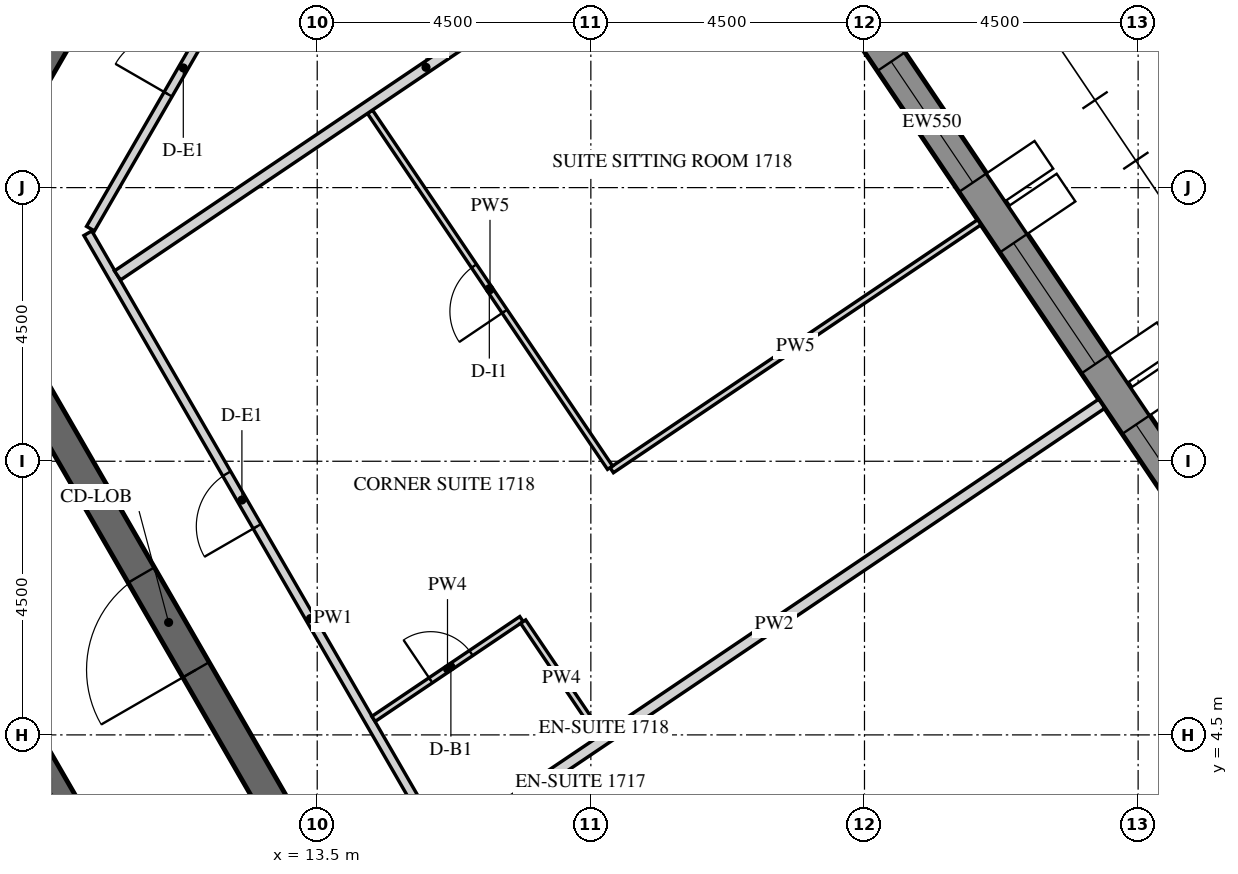
"""IFC4 building model, lengths in metres.
Left out: names, types, materials, properties, quantities, classifications, styles, units other than length and angle.
Written with IfcOpenShell. Run it as: python <this file> out.ifc"""

import sys

from ifc_helpers import new_model, si_unit, direction, frame, frame_2d, origin, place, context, subcontext, project, spatial, polyline, rectangle, outline, extrude, element, fill, save


model = new_model("IFC4")
c1 = context("Model", 3, precision=1e-05, world=origin(), true_north=direction((0.0, 1.0)))
c2 = subcontext(c1, "Body", "Model", "MODEL_VIEW")
j1 = project(units=[si_unit("LENGTHUNIT", "METRE"), si_unit("PLANEANGLEUNIT", "RADIAN")], contexts=[c1])
p1 = place(None, origin())
s1 = spatial("IfcSite", under=j1, at=p1, CompositionType="ELEMENT")
p2 = place(p1, origin())
s2 = spatial("IfcBuilding", under=s1, at=p2, CompositionType="ELEMENT")
p3 = place(p2, frame((0.0, 0.0, 215.1)))
s3 = spatial("IfcBuildingStorey", under=s2, at=p3, CompositionType="ELEMENT", Elevation=215.1)
p4 = place(p3, frame((31.371, 3.071, -0.15), z_axis=(0.0, 0.0, 1.0), x_axis=(-0.559189891278, 0.829039604297, 0.0)))
e1 = element("IfcWall", 1, at=p4, inside=s3, PredefinedType="SOLIDWALL", context=c2, shape_type="SweptSolid", body=[
    extrude(outline(polyline([(-0.026, -0.275), (27.781, -0.275), (27.736, 0.275), (0.026, 0.275), (-0.026, -0.275)])), origin(), (0.0, 0.0, 1.0), 3.9),
])
p5 = place(p4, frame((1.879, 0.0, 1.05)))
e2 = element("IfcOpeningElement", 2, at=p5, cuts=e1, PredefinedType="OPENING", context=c2, shape_type="SweptSolid", body=[
    extrude(rectangle(XDim=2.4, YDim=2.4, at=frame_2d((1.2, 1.2))), frame((0.0, 0.285, 0.0), z_axis=(0.0, -1.0, 0.0), x_axis=(1.0, 0.0, 0.0)), (0.0, 0.0, 1.0), 0.57),
])
p6 = place(p4, frame((5.479, 0.0, 1.05)))
e3 = element("IfcOpeningElement", 3, at=p6, cuts=e1, PredefinedType="OPENING", context=c2, shape_type="SweptSolid", body=[
    extrude(rectangle(XDim=2.4, YDim=2.4, at=frame_2d((1.2, 1.2))), frame((0.0, 0.285, 0.0), z_axis=(0.0, -1.0, 0.0), x_axis=(1.0, 0.0, 0.0)), (0.0, 0.0, 1.0), 0.57),
])
p7 = place(p4, frame((9.079, 0.0, 1.05)))
e4 = element("IfcOpeningElement", 4, at=p7, cuts=e1, PredefinedType="OPENING", context=c2, shape_type="SweptSolid", body=[
    extrude(rectangle(XDim=2.4, YDim=2.4, at=frame_2d((1.2, 1.2))), frame((0.0, 0.285, 0.0), z_axis=(0.0, -1.0, 0.0), x_axis=(1.0, 0.0, 0.0)), (0.0, 0.0, 1.0), 0.57),
])
p8 = place(p4, frame((12.679, 0.0, 1.05)))
e5 = element("IfcOpeningElement", 5, at=p8, cuts=e1, PredefinedType="OPENING", context=c2, shape_type="SweptSolid", body=[
    extrude(rectangle(XDim=2.4, YDim=2.4, at=frame_2d((1.2, 1.2))), frame((0.0, 0.285, 0.0), z_axis=(0.0, -1.0, 0.0), x_axis=(1.0, 0.0, 0.0)), (0.0, 0.0, 1.0), 0.57),
])
p9 = place(p4, frame((16.279, 0.0, 1.05)))
e6 = element("IfcOpeningElement", 6, at=p9, cuts=e1, PredefinedType="OPENING", context=c2, shape_type="SweptSolid", body=[
    extrude(rectangle(XDim=2.4, YDim=2.4, at=frame_2d((1.2, 1.2))), frame((0.0, 0.285, 0.0), z_axis=(0.0, -1.0, 0.0), x_axis=(1.0, 0.0, 0.0)), (0.0, 0.0, 1.0), 0.57),
])
p10 = place(p4, frame((19.879, 0.0, 1.05)))
e7 = element("IfcOpeningElement", 7, at=p10, cuts=e1, PredefinedType="OPENING", context=c2, shape_type="SweptSolid", body=[
    extrude(rectangle(XDim=2.4, YDim=2.4, at=frame_2d((1.2, 1.2))), frame((0.0, 0.285, 0.0), z_axis=(0.0, -1.0, 0.0), x_axis=(1.0, 0.0, 0.0)), (0.0, 0.0, 1.0), 0.57),
])
p11 = place(p4, frame((23.479, 0.0, 1.05)))
e8 = element("IfcOpeningElement", 8, at=p11, cuts=e1, PredefinedType="OPENING", context=c2, shape_type="SweptSolid", body=[
    extrude(rectangle(XDim=2.4, YDim=2.4, at=frame_2d((1.2, 1.2))), frame((0.0, 0.285, 0.0), z_axis=(0.0, -1.0, 0.0), x_axis=(1.0, 0.0, 0.0)), (0.0, 0.0, 1.0), 0.57),
])
p12 = place(p3, frame((14.722, 0.0, -0.15), z_axis=(0.0, 0.0, 1.0), x_axis=(-0.50000571537, 0.866022103989, 0.0)))
e9 = element("IfcWall", 9, at=p12, inside=s3, PredefinedType="SHEAR", context=c2, shape_type="SweptSolid", body=[
    extrude(outline(polyline([(-0.144, -0.25), (14.867, -0.25), (14.578, 0.25), (0.144, 0.25), (-0.144, -0.25)])), origin(), (0.0, 0.0, 1.0), 3.9),
])
p13 = place(p12, frame((6.432, 0.0, 0.15)))
e10 = element("IfcOpeningElement", 10, at=p13, cuts=e9, PredefinedType="OPENING", context=c2, shape_type="SweptSolid", body=[
    extrude(rectangle(XDim=1.8, YDim=2.4, at=frame_2d((0.9, 1.2))), frame((0.0, 0.26, 0.0), z_axis=(0.0, -1.0, 0.0), x_axis=(1.0, 0.0, 0.0)), (0.0, 0.0, 1.0), 0.52),
])
p14 = place(p3, frame((7.506, 13.0, -0.15), z_axis=(0.0, 0.0, 1.0), x_axis=(0.499988271576, 0.866032175087, 0.0)))
e11 = element("IfcWall", 11, at=p14, inside=s3, PredefinedType="SHEAR", context=c2, shape_type="SweptSolid", body=[
    extrude(rectangle(XDim=15.424, YDim=0.5, at=frame_2d((7.712, 0.0))), origin(), (0.0, 0.0, 1.0), 3.9),
])
p15 = place(p14, frame((6.812, 0.0, 0.15)))
e12 = element("IfcOpeningElement", 12, at=p15, cuts=e11, PredefinedType="OPENING", context=c2, shape_type="SweptSolid", body=[
    extrude(rectangle(XDim=1.8, YDim=2.4, at=frame_2d((0.9, 1.2))), frame((0.0, 0.26, 0.0), z_axis=(0.0, -1.0, 0.0), x_axis=(1.0, 0.0, 0.0)), (0.0, 0.0, 1.0), 0.52),
])
p16 = place(p3, frame((11.345, 0.0, -0.15), z_axis=(0.0, 0.0, 1.0), x_axis=(-0.499995046907, 0.866028263435, 0.0)))
e13 = element("IfcWall", 13, at=p16, inside=s3, PredefinedType="SHEAR", context=c2, shape_type="SweptSolid", body=[
    extrude(outline(polyline([(-0.101, -0.175), (11.446, -0.175), (11.244, 0.175), (0.101, 0.175), (-0.101, -0.175)])), origin(), (0.0, 0.0, 1.0), 3.9),
])
p17 = place(p16, frame((4.744, 0.0, 0.15)))
e14 = element("IfcOpeningElement", 14, at=p17, cuts=e13, PredefinedType="OPENING", context=c2, shape_type="SweptSolid", body=[
    extrude(rectangle(XDim=1.8, YDim=2.4, at=frame_2d((0.9, 1.2))), frame((0.0, 0.185, 0.0), z_axis=(0.0, -1.0, 0.0), x_axis=(1.0, 0.0, 0.0)), (0.0, 0.0, 1.0), 0.37),
])
p18 = place(p3, frame((10.149, 21.678, 0.0), z_axis=(0.0, 0.0, 1.0), x_axis=(-0.499997422768, -0.866026891745, 0.0)))
e15 = element("IfcWall", 15, at=p18, inside=s3, PredefinedType="PARTITIONING", context=c2, shape_type="SweptSolid", body=[
    extrude(rectangle(XDim=7.942, YDim=0.15, at=frame_2d((3.971, 0.0))), origin(), (0.0, 0.0, 1.0), 2.988),
])
p19 = place(p3, frame((17.046, 0.075, 0.0), z_axis=(0.0, 0.0, 1.0), x_axis=(-0.500008833422, 0.866020303746, 0.0)))
e16 = element("IfcWall", 16, at=p19, inside=s3, PredefinedType="PARTITIONING", context=c2, shape_type="SweptSolid", body=[
    extrude(rectangle(XDim=14.636, YDim=0.15, at=frame_2d((7.318, 0.0))), origin(), (0.0, 0.0, 1.0), 2.988),
])
p20 = place(p19, frame((9.07, 0.0, 0.0)))
e17 = element("IfcOpeningElement", 17, at=p20, cuts=e16, PredefinedType="OPENING", context=c2, shape_type="SweptSolid", body=[
    extrude(rectangle(XDim=1.0, YDim=2.1, at=frame_2d((0.5, 1.05))), frame((0.0, 0.085, 0.0), z_axis=(0.0, -1.0, 0.0), x_axis=(1.0, 0.0, 0.0)), (0.0, 0.0, 1.0), 0.17),
])
p21 = place(p3, frame((9.772, 12.825, 0.0), z_axis=(0.0, 0.0, 1.0), x_axis=(0.499989830942, 0.866031274813, 0.0)))
e18 = element("IfcWall", 18, at=p21, inside=s3, PredefinedType="PARTITIONING", context=c2, shape_type="SweptSolid", body=[
    extrude(rectangle(XDim=7.93, YDim=0.15, at=frame_2d((3.965, 0.0))), origin(), (0.0, 0.0, 1.0), 2.988),
])
p22 = place(p21, frame((2.552, 0.0, 0.0)))
e19 = element("IfcOpeningElement", 19, at=p22, cuts=e18, PredefinedType="OPENING", context=c2, shape_type="SweptSolid", body=[
    extrude(rectangle(XDim=1.0, YDim=2.1, at=frame_2d((0.5, 1.05))), frame((0.0, 0.085, 0.0), z_axis=(0.0, -1.0, 0.0), x_axis=(1.0, 0.0, 0.0)), (0.0, 0.0, 1.0), 0.17),
])
p23 = place(p3, frame((15.807, 2.372, 0.0), z_axis=(0.0, 0.0, 1.0), x_axis=(0.86601045545, 0.500025890382, 0.0)))
e20 = element("IfcWall", 20, at=p23, inside=s3, PredefinedType="PARTITIONING", context=c2, shape_type="SweptSolid", body=[
    extrude(rectangle(XDim=2.925, YDim=0.1, at=frame_2d((1.462, 0.0))), origin(), (0.0, 0.0, 1.0), 2.988),
])
p24 = place(p3, frame((18.365, 3.791, 0.0), z_axis=(0.0, 0.0, 1.0), x_axis=(0.499996545922, -0.866027397988, 0.0)))
e21 = element("IfcWall", 21, at=p24, inside=s3, PredefinedType="PARTITIONING", context=c2, shape_type="SweptSolid", body=[
    extrude(rectangle(XDim=2.75, YDim=0.1, at=frame_2d((1.375, 0.0))), origin(), (0.0, 0.0, 1.0), 2.988),
])
p25 = place(p3, frame((26.402, 9.946, 0.0), z_axis=(0.0, 0.0, 1.0), x_axis=(-0.829032022697, -0.559201131386, 0.0)))
e22 = element("IfcWall", 22, at=p25, inside=s3, PredefinedType="PARTITIONING", context=c2, shape_type="SweptSolid", body=[
    extrude(rectangle(XDim=12.995, YDim=0.18, at=frame_2d((6.497, 0.0))), origin(), (0.0, 0.0, 1.0), 2.988),
])
p26 = place(p3, frame((14.426, 4.763, 0.0), z_axis=(0.0, 0.0, 1.0), x_axis=(0.829055983973, 0.559165606451, 0.0)))
e23 = element("IfcWall", 23, at=p26, inside=s3, PredefinedType="PARTITIONING", context=c2, shape_type="SweptSolid", body=[
    extrude(rectangle(XDim=2.935, YDim=0.1, at=frame_2d((1.467, 0.0))), origin(), (0.0, 0.0, 1.0), 2.988),
])
p27 = place(p26, frame((1.135, 0.0, 0.0)))
e24 = element("IfcOpeningElement", 24, at=p27, cuts=e23, PredefinedType="OPENING", context=c2, shape_type="SweptSolid", body=[
    extrude(rectangle(XDim=0.8, YDim=2.1, at=frame_2d((0.4, 1.05))), frame((0.0, 0.06, 0.0), z_axis=(0.0, -1.0, 0.0), x_axis=(1.0, 0.0, 0.0)), (0.0, 0.0, 1.0), 0.12),
])
p28 = place(p3, frame((16.887, 6.363, 0.0), z_axis=(0.0, 0.0, 1.0), x_axis=(0.559179660023, -0.829046505219, 0.0)))
e25 = element("IfcWall", 25, at=p28, inside=s3, PredefinedType="PARTITIONING", context=c2, shape_type="SweptSolid", body=[
    extrude(rectangle(XDim=2.26, YDim=0.1, at=frame_2d((1.13, 0.0))), origin(), (0.0, 0.0, 1.0), 2.988),
])
p29 = place(p3, frame((24.389, 12.931, 0.0), z_axis=(0.0, 0.0, 1.0), x_axis=(-0.829029895244, -0.559204285383, 0.0)))
e26 = element("IfcWall", 26, at=p29, inside=s3, PredefinedType="PARTITIONING", context=c2, shape_type="SweptSolid", body=[
    extrude(rectangle(XDim=7.292, YDim=0.1, at=frame_2d((3.646, 0.0))), origin(), (0.0, 0.0, 1.0), 2.988),
])
p30 = place(p3, frame((18.315, 8.895, 0.0), z_axis=(0.0, 0.0, 1.0), x_axis=(-0.559177045947, 0.829048268369, 0.0)))
e27 = element("IfcWall", 27, at=p30, inside=s3, PredefinedType="PARTITIONING", context=c2, shape_type="SweptSolid", body=[
    extrude(rectangle(XDim=7.06, YDim=0.1, at=frame_2d((3.53, 0.0))), origin(), (0.0, 0.0, 1.0), 2.988),
])
p31 = place(p30, frame((3.1, 0.0, 0.0)))
e28 = element("IfcOpeningElement", 28, at=p31, cuts=e27, PredefinedType="OPENING", context=c2, shape_type="SweptSolid", body=[
    extrude(rectangle(XDim=0.9, YDim=2.1, at=frame_2d((0.45, 1.05))), frame((0.0, 0.06, 0.0), z_axis=(0.0, -1.0, 0.0), x_axis=(1.0, 0.0, 0.0)), (0.0, 0.0, 1.0), 0.12),
])
p32 = place(p3, frame((20.363, 18.9, 0.0), z_axis=(0.0, 0.0, 1.0), x_axis=(-0.829030622766, -0.559203206819, 0.0)))
e29 = element("IfcWall", 29, at=p32, inside=s3, PredefinedType="PARTITIONING", context=c2, shape_type="SweptSolid", body=[
    extrude(rectangle(XDim=12.239, YDim=0.18, at=frame_2d((6.12, 0.0))), origin(), (0.0, 0.0, 1.0), 2.988),
])
p33 = place(p6, frame((0.0, 0.205, 0.0)))
e30 = element("IfcWindow", 30, at=p33, inside=s3, PartitioningType="DOUBLE_PANEL_VERTICAL", PredefinedType="WINDOW", context=c2, shape_type="SweptSolid", body=[
    extrude(rectangle(XDim=2.4, YDim=2.4, at=frame_2d((1.2, 1.2))), frame((0.0, 0.03, 0.0), z_axis=(0.0, -1.0, 0.0), x_axis=(1.0, 0.0, 0.0)), (0.0, 0.0, 1.0), 0.06),
])
fill(e3, e30)
p34 = place(p7, frame((0.0, 0.205, 0.0)))
e31 = element("IfcWindow", 31, at=p34, inside=s3, PartitioningType="DOUBLE_PANEL_VERTICAL", PredefinedType="WINDOW", context=c2, shape_type="SweptSolid", body=[
    extrude(rectangle(XDim=2.4, YDim=2.4, at=frame_2d((1.2, 1.2))), frame((0.0, 0.03, 0.0), z_axis=(0.0, -1.0, 0.0), x_axis=(1.0, 0.0, 0.0)), (0.0, 0.0, 1.0), 0.06),
])
fill(e4, e31)
p35 = place(p8, frame((0.0, 0.205, 0.0)))
e32 = element("IfcWindow", 32, at=p35, inside=s3, PartitioningType="DOUBLE_PANEL_VERTICAL", PredefinedType="WINDOW", context=c2, shape_type="SweptSolid", body=[
    extrude(rectangle(XDim=2.4, YDim=2.4, at=frame_2d((1.2, 1.2))), frame((0.0, 0.03, 0.0), z_axis=(0.0, -1.0, 0.0), x_axis=(1.0, 0.0, 0.0)), (0.0, 0.0, 1.0), 0.06),
])
fill(e5, e32)
p36 = place(p13, origin())
e33 = element("IfcDoor", 33, at=p36, inside=s3, OperationType="DOUBLE_DOOR_SINGLE_SWING", PredefinedType="DOOR", context=c2, shape_type="SweptSolid", body=[
    extrude(rectangle(XDim=1.8, YDim=2.4, at=frame_2d((0.9, 1.2))), frame((0.0, 0.025, 0.0), z_axis=(0.0, -1.0, 0.0), x_axis=(1.0, 0.0, 0.0)), (0.0, 0.0, 1.0), 0.05),
])
fill(e10, e33)
p37 = place(p20, origin())
e34 = element("IfcDoor", 34, at=p37, inside=s3, OperationType="SINGLE_SWING_RIGHT", PredefinedType="DOOR", context=c2, shape_type="SweptSolid", body=[
    extrude(rectangle(XDim=1.0, YDim=2.1, at=frame_2d((0.5, 1.05))), frame((0.0, 0.025, 0.0), z_axis=(0.0, -1.0, 0.0), x_axis=(1.0, 0.0, 0.0)), (0.0, 0.0, 1.0), 0.05),
])
fill(e17, e34)
p38 = place(p27, origin())
e35 = element("IfcDoor", 35, at=p38, inside=s3, OperationType="SINGLE_SWING_LEFT", PredefinedType="DOOR", context=c2, shape_type="SweptSolid", body=[
    extrude(rectangle(XDim=0.8, YDim=2.1, at=frame_2d((0.4, 1.05))), frame((0.0, 0.025, 0.0), z_axis=(0.0, -1.0, 0.0), x_axis=(1.0, 0.0, 0.0)), (0.0, 0.0, 1.0), 0.05),
])
fill(e24, e35)
p39 = place(p31, origin())
e36 = element("IfcDoor", 36, at=p39, inside=s3, OperationType="SINGLE_SWING_LEFT", PredefinedType="DOOR", context=c2, shape_type="SweptSolid", body=[
    extrude(rectangle(XDim=0.9, YDim=2.1, at=frame_2d((0.45, 1.05))), frame((0.0, 0.025, 0.0), z_axis=(0.0, -1.0, 0.0), x_axis=(1.0, 0.0, 0.0)), (0.0, 0.0, 1.0), 0.05),
])
fill(e28, e36)
p40 = place(p22, origin())
e37 = element("IfcDoor", 37, at=p40, inside=s3, OperationType="SINGLE_SWING_RIGHT", PredefinedType="DOOR", context=c2, shape_type="SweptSolid", body=[
    extrude(rectangle(XDim=1.0, YDim=2.1, at=frame_2d((0.5, 1.05))), frame((0.0, 0.025, 0.0), z_axis=(0.0, -1.0, 0.0), x_axis=(1.0, 0.0, 0.0)), (0.0, 0.0, 1.0), 0.05),
])
fill(e19, e37)
save(model, sys.argv[1])
